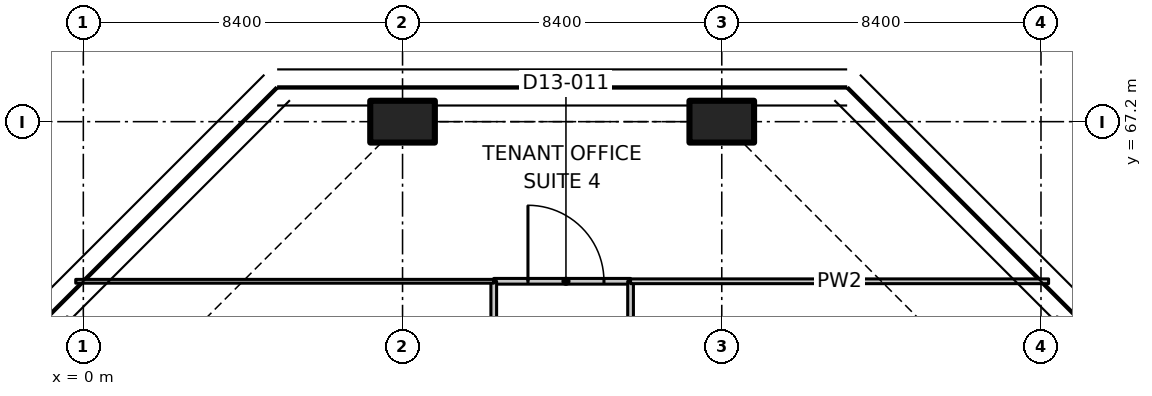
"""IFC4 building model, lengths in metres.
Left out: names, types, materials, properties, quantities, classifications, styles, units other than length and angle.
Written with IfcOpenShell. Run it as: python <this file> out.ifc"""

import sys

from ifc_helpers import new_model, si_unit, direction, frame, frame_2d, origin, origin_2d, place, context, subcontext, project, spatial, polyline, rectangle, outline, extrude, element, fill, save


model = new_model("IFC4")
c1 = context("Model", 3, precision=1e-05, world=origin(), true_north=direction((0.0, 1.0)))
c2 = subcontext(c1, "Body", "Model", "MODEL_VIEW")
j1 = project(units=[si_unit("LENGTHUNIT", "METRE"), si_unit("PLANEANGLEUNIT", "RADIAN")], contexts=[c1])
p1 = place(None, origin())
s1 = spatial("IfcSite", under=j1, at=p1, CompositionType="ELEMENT")
p2 = place(p1, origin())
s2 = spatial("IfcBuilding", under=s1, at=p2, CompositionType="ELEMENT")
p3 = place(p2, frame((0.0, 0.0, 95.3)))
s3 = spatial("IfcBuildingStorey", under=s2, at=p3, CompositionType="ELEMENT", Elevation=95.3)
for number, where, z_axis, x_axis in (
    (1, (8.4, 67.2, 0.0), (0.0, 0.0, 1.0), (0.0, 1.0, 0.0)),
    (2, (16.8, 67.2, 0.0), (0.0, 0.0, 1.0), (0.0, 1.0, 0.0)),
):
    element("IfcColumn", number, at=place(p3, frame(where, z_axis=z_axis, x_axis=x_axis)), inside=s3, PredefinedType="COLUMN", context=c2, shape_type="SweptSolid", body=[
        extrude(rectangle(XDim=1.1, YDim=1.7, at=origin_2d()), origin(), (0.0, 0.0, 1.0), 3.35),
    ])
p4 = place(p3, frame((10.8, 63.0, 0.0), z_axis=(0.0, 0.0, 1.0), x_axis=(1.0, 0.0, 0.0)))
e3 = element("IfcWall", 3, at=p4, inside=s3, PredefinedType="PARTITIONING", context=c2, shape_type="SweptSolid", body=[
    extrude(rectangle(XDim=3.6, YDim=0.15, at=frame_2d((1.8, 0.0))), origin(), (0.0, 0.0, 1.0), 3.33),
])
p5 = place(p4, frame((0.9, 0.0, 0.0)))
e4 = element("IfcOpeningElement", 4, at=p5, cuts=e3, PredefinedType="OPENING", context=c2, shape_type="SweptSolid", body=[
    extrude(rectangle(XDim=2.0, YDim=2.4, at=frame_2d((1.0, 1.2))), frame((0.0, 0.085, 0.0), z_axis=(0.0, -1.0, 0.0), x_axis=(1.0, 0.0, 0.0)), (0.0, 0.0, 1.0), 0.17),
])
p6 = place(p3, frame((10.8, 54.6, 0.0), z_axis=(0.0, 0.0, 1.0), x_axis=(0.0, 1.0, 0.0)))
e5 = element("IfcWall", 5, at=p6, inside=s3, PredefinedType="PARTITIONING", context=c2, shape_type="SweptSolid", body=[
    extrude(rectangle(XDim=8.4, YDim=0.15, at=frame_2d((4.2, 0.0))), origin(), (0.0, 0.0, 1.0), 3.33),
])
p7 = place(p6, frame((3.3, 0.0, 0.0)))
e6 = element("IfcOpeningElement", 6, at=p7, cuts=e5, PredefinedType="OPENING", context=c2, shape_type="SweptSolid", body=[
    extrude(rectangle(XDim=1.6, YDim=2.1, at=frame_2d((0.8, 1.05))), frame((0.0, 0.085, 0.0), z_axis=(0.0, -1.0, 0.0), x_axis=(1.0, 0.0, 0.0)), (0.0, 0.0, 1.0), 0.17),
])
p8 = place(p3, frame((14.4, 63.0, 0.0), z_axis=(0.0, 0.0, 1.0), x_axis=(0.0, -1.0, 0.0)))
e7 = element("IfcWall", 7, at=p8, inside=s3, PredefinedType="PARTITIONING", context=c2, shape_type="SweptSolid", body=[
    extrude(rectangle(XDim=8.4, YDim=0.15, at=frame_2d((4.2, 0.0))), origin(), (0.0, 0.0, 1.0), 3.33),
])
p9 = place(p8, frame((3.3, 0.0, 0.0)))
e8 = element("IfcOpeningElement", 8, at=p9, cuts=e7, PredefinedType="OPENING", context=c2, shape_type="SweptSolid", body=[
    extrude(rectangle(XDim=1.6, YDim=2.1, at=frame_2d((0.8, 1.05))), frame((0.0, 0.085, 0.0), z_axis=(0.0, -1.0, 0.0), x_axis=(1.0, 0.0, 0.0)), (0.0, 0.0, 1.0), 0.17),
])
p10 = place(p3, frame((10.8, 63.0, 0.0), z_axis=(0.0, 0.0, 1.0), x_axis=(-1.0, 0.0, 0.0)))
e9 = element("IfcWall", 9, at=p10, inside=s3, PredefinedType="PARTITIONING", context=c2, shape_type="SweptSolid", body=[
    extrude(outline(polyline([(0.0, 0.0), (11.0, 0.0), (11.0, 3.33), (7.266, 3.33), (7.264, 2.98), (5.936, 2.98), (5.934, 3.33), (0.0, 3.33), (0.0, 0.0)])), frame((0.0, 0.05, 0.0), z_axis=(0.0, -1.0, 0.0), x_axis=(1.0, 0.0, 0.0)), (0.0, 0.0, 1.0), 0.1),
])
p11 = place(p3, frame((25.4, 63.0, 0.0), z_axis=(0.0, 0.0, 1.0), x_axis=(-1.0, 0.0, 0.0)))
e10 = element("IfcWall", 10, at=p11, inside=s3, PredefinedType="PARTITIONING", context=c2, shape_type="SweptSolid", body=[
    extrude(outline(polyline([(0.0, 0.0), (11.0, 0.0), (11.0, 3.33), (5.078, 3.33), (5.076, 2.98), (3.724, 2.98), (3.722, 3.33), (0.0, 3.33), (0.0, 0.0)])), frame((0.0, 0.062, 0.0), z_axis=(0.0, -1.0, 0.0), x_axis=(1.0, 0.0, 0.0)), (0.0, 0.0, 1.0), 0.125),
])
p12 = place(p5, origin())
e11 = element("IfcDoor", 11, at=p12, inside=s3, OperationType="DOUBLE_DOOR_SINGLE_SWING", PredefinedType="DOOR", context=c2, shape_type="SweptSolid", body=[
    extrude(rectangle(XDim=2.0, YDim=2.4, at=frame_2d((1.0, 1.2))), frame((0.0, 0.025, 0.0), z_axis=(0.0, -1.0, 0.0), x_axis=(1.0, 0.0, 0.0)), (0.0, 0.0, 1.0), 0.05),
])
fill(e4, e11)
save(model, sys.argv[1])
